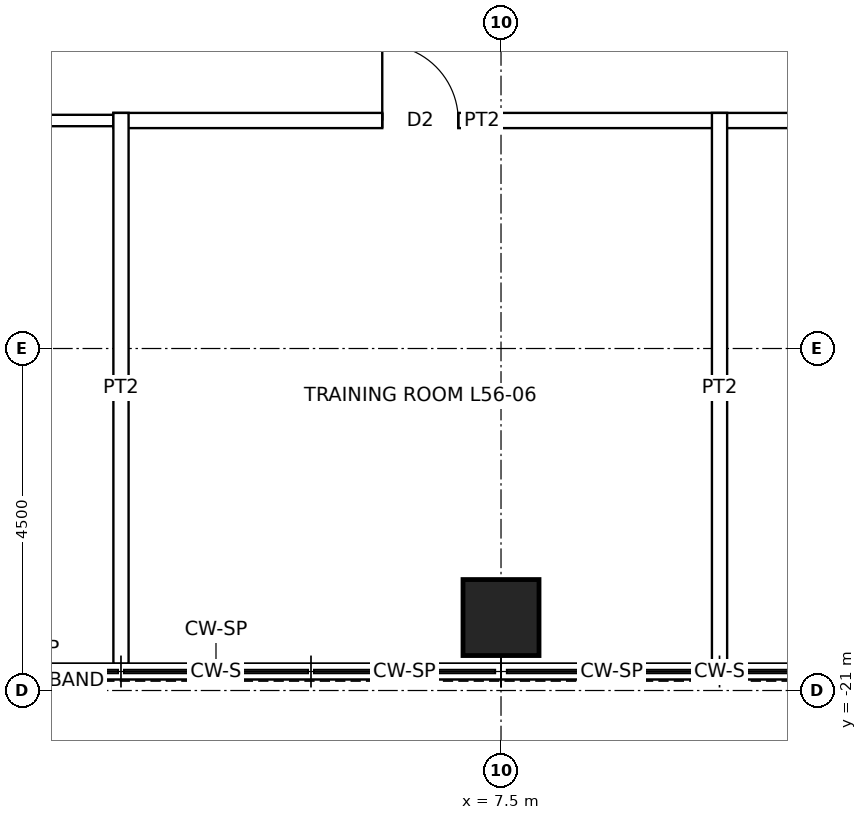
"""IFC4 building model, lengths in metres.
Left out: names, types, materials, properties, quantities, classifications, styles, units other than length and angle.
Written with IfcOpenShell. Run it as: python <this file> out.ifc"""

import sys

from ifc_helpers import new_model, si_unit, direction, frame, frame_2d, origin, origin_2d, place, context, subcontext, project, spatial, rectangle, hollow_rectangle, extrude, element, fill, save


model = new_model("IFC4")
c1 = context("Model", 3, precision=1e-05, world=origin(), true_north=direction((0.0, 1.0)))
c2 = subcontext(c1, "Body", "Model", "MODEL_VIEW")
j1 = project(units=[si_unit("LENGTHUNIT", "METRE"), si_unit("PLANEANGLEUNIT", "RADIAN")], contexts=[c1])
p1 = place(None, origin())
s1 = spatial("IfcSite", under=j1, at=p1, CompositionType="ELEMENT")
p2 = place(p1, origin())
s2 = spatial("IfcBuilding", under=s1, at=p2, CompositionType="ELEMENT")
p3 = place(p2, frame((0.0, 0.0, 259.9)))
s3 = spatial("IfcBuildingStorey", under=s2, at=p3, CompositionType="ELEMENT", Elevation=259.9)
p4 = place(p3, frame((7.5, -20.04, 0.0), z_axis=(0.0, 0.0, 1.0), x_axis=(1.0, 0.0, 0.0)))
e1 = element("IfcColumn", 1, at=p4, inside=s3, PredefinedType="COLUMN", context=c2, shape_type="SweptSolid", body=[
    extrude(hollow_rectangle(XDim=1.0, YDim=1.0, WallThickness=0.075, at=origin_2d()), origin(), (0.0, 0.0, 1.0), 4.0),
])
p5 = place(p3, frame((-10.45, -13.5, 0.0), z_axis=(0.0, 0.0, 1.0), x_axis=(1.0, 0.0, 0.0)))
e2 = element("IfcWall", 2, at=p5, inside=s3, PredefinedType="PARTITIONING", context=c2, shape_type="SweptSolid", body=[
    extrude(rectangle(XDim=13.025, YDim=0.15, at=frame_2d((6.512, 0.0))), origin(), (0.0, 0.0, 1.0), 3.85),
])
p6 = place(p5, frame((7.45, 0.0, 0.0)))
e3 = element("IfcOpeningElement", 3, at=p6, cuts=e2, PredefinedType="OPENING", context=c2, shape_type="SweptSolid", body=[
    extrude(rectangle(XDim=1.0, YDim=2.4, at=frame_2d((0.5, 1.2))), frame((0.0, 0.085, 0.0), z_axis=(0.0, -1.0, 0.0), x_axis=(1.0, 0.0, 0.0)), (0.0, 0.0, 1.0), 0.17),
])
p7 = place(p3, frame((2.4, -13.5, 0.0), z_axis=(0.0, 0.0, 1.0), x_axis=(1.0, 0.0, 0.0)))
e4 = element("IfcWall", 4, at=p7, inside=s3, PredefinedType="PARTITIONING", context=c2, shape_type="SweptSolid", body=[
    extrude(rectangle(XDim=9.7, YDim=0.2, at=frame_2d((4.85, 0.0))), origin(), (0.0, 0.0, 1.0), 3.85),
])
p8 = place(p7, frame((3.538, 0.0, 0.0)))
e5 = element("IfcOpeningElement", 5, at=p8, cuts=e4, PredefinedType="OPENING", context=c2, shape_type="SweptSolid", body=[
    extrude(rectangle(XDim=1.0, YDim=2.1, at=frame_2d((0.5, 1.05))), frame((0.0, 0.11, 0.0), z_axis=(0.0, -1.0, 0.0), x_axis=(1.0, 0.0, 0.0)), (0.0, 0.0, 1.0), 0.22),
])
for number, where, z_axis, x_axis in (
    (6, (2.5, -20.65, 0.0), (0.0, 0.0, 1.0), (0.0, 1.0, 0.0)),
    (7, (10.375, -20.65, 0.0), (0.0, 0.0, 1.0), (0.0, 1.0, 0.0)),
):
    element("IfcWall", number, at=place(p3, frame(where, z_axis=z_axis, x_axis=x_axis)), inside=s3, PredefinedType="PARTITIONING", context=c2, shape_type="SweptSolid", body=[
        extrude(rectangle(XDim=7.25, YDim=0.2, at=frame_2d((3.625, 0.0))), origin(), (0.0, 0.0, 1.0), 3.85),
    ])
p9 = place(p8, origin())
e8 = element("IfcDoor", 8, at=p9, inside=s3, OperationType="SINGLE_SWING_LEFT", PredefinedType="DOOR", context=c2, shape_type="SweptSolid", body=[
    extrude(rectangle(XDim=1.0, YDim=2.1, at=frame_2d((0.5, 1.05))), frame((0.0, 0.025, 0.0), z_axis=(0.0, -1.0, 0.0), x_axis=(1.0, 0.0, 0.0)), (0.0, 0.0, 1.0), 0.05),
])
fill(e5, e8)
save(model, sys.argv[1])
